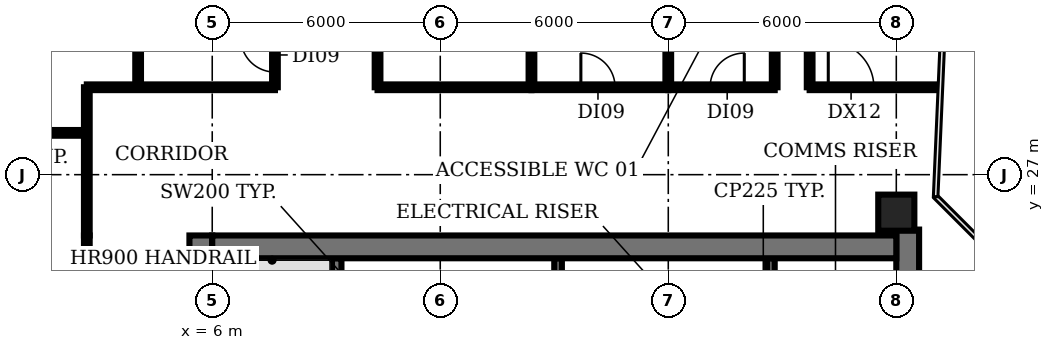
"""IFC4 building model, lengths in metres.
Left out: names, types, materials, properties, quantities, classifications, styles, units other than length and angle.
Written with IfcOpenShell. Run it as: python <this file> out.ifc"""

import sys

from ifc_helpers import new_model, si_unit, direction, frame, frame_2d, origin, origin_2d, place, context, subcontext, project, spatial, rectangle, circle, extrude, element, fill, save


model = new_model("IFC4")
c1 = context("Model", 3, precision=1e-05, world=origin(), true_north=direction((0.0, 1.0)))
c2 = subcontext(c1, "Body", "Model", "MODEL_VIEW")
j1 = project(units=[si_unit("LENGTHUNIT", "METRE"), si_unit("PLANEANGLEUNIT", "RADIAN")], contexts=[c1])
p1 = place(None, origin())
s1 = spatial("IfcSite", under=j1, at=p1, CompositionType="ELEMENT")
p2 = place(p1, origin())
s2 = spatial("IfcBuilding", under=s1, at=p2, CompositionType="ELEMENT")
p3 = place(p2, frame((0.0, 0.0, 159.2)))
s3 = spatial("IfcBuildingStorey", under=s2, at=p3, CompositionType="ELEMENT", Elevation=159.2)
p4 = place(p3, frame((24.0, 26.0, 0.0), z_axis=(0.0, 0.0, 1.0), x_axis=(1.0, 0.0, 0.0)))
e1 = element("IfcColumn", 1, at=p4, inside=s3, PredefinedType="COLUMN", context=c2, shape_type="SweptSolid", body=[
    extrude(circle(Radius=0.475, at=origin_2d()), origin(), (0.0, 0.0, 1.0), 3.85),
])
p5 = place(p3, frame((9.275, 18.375, 0.0), z_axis=(0.0, 0.0, 1.0), x_axis=(0.0, 1.0, 0.0)))
e2 = element("IfcWall", 2, at=p5, inside=s3, PredefinedType="SHEAR", context=c2, shape_type="SweptSolid", body=[
    extrude(rectangle(XDim=6.425, YDim=0.25, at=frame_2d((3.212, 0.0))), origin(), (0.0, 0.0, 1.0), 3.85),
])
for number, where, z_axis, x_axis in (
    (3, (15.1, 22.9, 0.0), (0.0, 0.0, 1.0), (0.0, 1.0, 0.0)),
    (4, (20.7, 22.9, 0.0), (0.0, 0.0, 1.0), (0.0, 1.0, 0.0)),
):
    element("IfcWall", number, at=place(p3, frame(where, z_axis=z_axis, x_axis=x_axis)), inside=s3, PredefinedType="SHEAR", context=c2, shape_type="SweptSolid", body=[
        extrude(rectangle(XDim=1.9, YDim=0.2, at=frame_2d((0.95, 0.0))), origin(), (0.0, 0.0, 1.0), 3.85),
    ])
p6 = place(p3, frame((5.7, 4.8, 0.0), z_axis=(0.0, 0.0, 1.0), x_axis=(0.0, 1.0, 0.0)))
e5 = element("IfcWall", 5, at=p6, inside=s3, PredefinedType="SHEAR", context=c2, shape_type="SweptSolid", body=[
    extrude(rectangle(XDim=20.6, YDim=0.6, at=frame_2d((10.3, 0.0))), origin(), (0.0, 0.0, 1.0), 3.85),
])
p7 = place(p6, frame((0.85, 0.0, 0.0)))
e6 = element("IfcOpeningElement", 6, at=p7, cuts=e5, PredefinedType="OPENING", context=c2, shape_type="SweptSolid", body=[
    extrude(rectangle(XDim=1.5, YDim=2.1, at=frame_2d((0.75, 1.05))), frame((0.0, 0.31, 0.0), z_axis=(0.0, -1.0, 0.0), x_axis=(1.0, 0.0, 0.0)), (0.0, 0.0, 1.0), 0.62),
])
p8 = place(p6, frame((7.3, 0.0, 0.0)))
e7 = element("IfcOpeningElement", 7, at=p8, cuts=e5, PredefinedType="OPENING", context=c2, shape_type="SweptSolid", body=[
    extrude(rectangle(XDim=1.2, YDim=2.1, at=frame_2d((0.6, 1.05))), frame((0.0, 0.31, 0.0), z_axis=(0.0, -1.0, 0.0), x_axis=(1.0, 0.0, 0.0)), (0.0, 0.0, 1.0), 0.62),
])
p9 = place(p6, frame((13.85, 0.0, 0.0)))
e8 = element("IfcOpeningElement", 8, at=p9, cuts=e5, PredefinedType="OPENING", context=c2, shape_type="SweptSolid", body=[
    extrude(rectangle(XDim=1.2, YDim=2.1, at=frame_2d((0.6, 1.05))), frame((0.0, 0.31, 0.0), z_axis=(0.0, -1.0, 0.0), x_axis=(1.0, 0.0, 0.0)), (0.0, 0.0, 1.0), 0.62),
])
p10 = place(p3, frame((24.3, 25.555, 0.0), z_axis=(0.0, 0.0, 1.0), x_axis=(0.0, -1.0, 0.0)))
e9 = element("IfcWall", 9, at=p10, inside=s3, PredefinedType="SHEAR", context=c2, shape_type="SweptSolid", body=[
    extrude(rectangle(XDim=20.755, YDim=0.6, at=frame_2d((10.377, 0.0))), origin(), (0.0, 0.0, 1.0), 3.85),
])
p11 = place(p10, frame((18.405, 0.0, 0.0)))
e10 = element("IfcOpeningElement", 10, at=p11, cuts=e9, PredefinedType="OPENING", context=c2, shape_type="SweptSolid", body=[
    extrude(rectangle(XDim=1.5, YDim=2.1, at=frame_2d((0.75, 1.05))), frame((0.0, 0.31, 0.0), z_axis=(0.0, -1.0, 0.0), x_axis=(1.0, 0.0, 0.0)), (0.0, 0.0, 1.0), 0.62),
])
p12 = place(p10, frame((12.305, 0.0, 0.0)))
e11 = element("IfcOpeningElement", 11, at=p12, cuts=e9, PredefinedType="OPENING", context=c2, shape_type="SweptSolid", body=[
    extrude(rectangle(XDim=0.9, YDim=2.1, at=frame_2d((0.45, 1.05))), frame((0.0, 0.31, 0.0), z_axis=(0.0, -1.0, 0.0), x_axis=(1.0, 0.0, 0.0)), (0.0, 0.0, 1.0), 0.62),
])
p13 = place(p10, frame((6.305, 0.0, 0.0)))
e12 = element("IfcOpeningElement", 12, at=p13, cuts=e9, PredefinedType="OPENING", context=c2, shape_type="SweptSolid", body=[
    extrude(rectangle(XDim=2.0, YDim=2.1, at=frame_2d((1.0, 1.05))), frame((0.0, 0.31, 0.0), z_axis=(0.0, -1.0, 0.0), x_axis=(1.0, 0.0, 0.0)), (0.0, 0.0, 1.0), 0.62),
])
p14 = place(p3, frame((6.0, 25.1, 0.0), z_axis=(0.0, 0.0, 1.0), x_axis=(1.0, 0.0, 0.0)))
e13 = element("IfcWall", 13, at=p14, inside=s3, PredefinedType="SHEAR", context=c2, shape_type="SweptSolid", body=[
    extrude(rectangle(XDim=18.0, YDim=0.6, at=frame_2d((9.0, 0.0))), origin(), (0.0, 0.0, 1.0), 3.85),
])
p15 = place(p3, frame((-0.98, 28.1, 0.0), z_axis=(0.0, 0.0, 1.0), x_axis=(1.0, 0.0, 0.0)))
e14 = element("IfcWall", 14, at=p15, inside=s3, PredefinedType="PARTITIONING", context=c2, shape_type="SweptSolid", body=[
    extrude(rectangle(XDim=3.68, YDim=0.15, at=frame_2d((1.84, 0.0))), origin(), (0.0, 0.0, 1.0), 2.88),
])
p16 = place(p3, frame((2.7, 4.8, 0.0), z_axis=(0.0, 0.0, 1.0), x_axis=(0.0, 1.0, 0.0)))
e15 = element("IfcWall", 15, at=p16, inside=s3, PredefinedType="PARTITIONING", context=c2, shape_type="SweptSolid", body=[
    extrude(rectangle(XDim=20.6, YDim=0.15, at=frame_2d((10.3, 0.0))), origin(), (0.0, 0.0, 1.0), 2.88),
])
p17 = place(p16, frame((10.2, 0.0, 0.0)))
e16 = element("IfcOpeningElement", 16, at=p17, cuts=e15, PredefinedType="OPENING", context=c2, shape_type="SweptSolid", body=[
    extrude(rectangle(XDim=1.2, YDim=2.1, at=frame_2d((0.6, 1.05))), frame((0.0, 0.085, 0.0), z_axis=(0.0, -1.0, 0.0), x_axis=(1.0, 0.0, 0.0)), (0.0, 0.0, 1.0), 0.17),
])
p18 = place(p3, frame((2.7, 25.4, 0.0), z_axis=(0.0, 0.0, 1.0), x_axis=(0.0, 1.0, 0.0)))
e17 = element("IfcWall", 17, at=p18, inside=s3, PredefinedType="PARTITIONING", context=c2, shape_type="SweptSolid", body=[
    extrude(rectangle(XDim=3.9, YDim=0.15, at=frame_2d((1.95, 0.0))), origin(), (0.0, 0.0, 1.0), 2.88),
])
p19 = place(p3, frame((2.7, 29.3, 0.0), z_axis=(0.0, 0.0, 1.0), x_axis=(1.0, 0.0, 0.0)))
e18 = element("IfcWall", 18, at=p19, inside=s3, PredefinedType="PARTITIONING", context=c2, shape_type="SweptSolid", body=[
    extrude(rectangle(XDim=4.95, YDim=0.15, at=frame_2d((2.475, 0.0))), origin(), (0.0, 0.0, 1.0), 2.88),
])
p20 = place(p3, frame((4.05, 29.3, 0.0), z_axis=(0.0, 0.0, 1.0), x_axis=(0.0, 1.0, 0.0)))
e19 = element("IfcWall", 19, at=p20, inside=s3, PredefinedType="PARTITIONING", context=c2, shape_type="SweptSolid", body=[
    extrude(rectangle(XDim=4.8, YDim=0.15, at=frame_2d((2.4, 0.0))), origin(), (0.0, 0.0, 1.0), 2.88),
])
p21 = place(p3, frame((7.65, 29.3, 0.0), z_axis=(0.0, 0.0, 1.0), x_axis=(0.0, 1.0, 0.0)))
e20 = element("IfcWall", 20, at=p21, inside=s3, PredefinedType="PARTITIONING", context=c2, shape_type="SweptSolid", body=[
    extrude(rectangle(XDim=4.8, YDim=0.15, at=frame_2d((2.4, 0.0))), origin(), (0.0, 0.0, 1.0), 2.88),
])
p22 = place(p21, frame((0.4, 0.0, 0.0)))
e21 = element("IfcOpeningElement", 21, at=p22, cuts=e20, PredefinedType="OPENING", context=c2, shape_type="SweptSolid", body=[
    extrude(rectangle(XDim=0.9, YDim=2.1, at=frame_2d((0.45, 1.05))), frame((0.0, 0.085, 0.0), z_axis=(0.0, -1.0, 0.0), x_axis=(1.0, 0.0, 0.0)), (0.0, 0.0, 1.0), 0.17),
])
p23 = place(p3, frame((10.35, 29.3, 0.0), z_axis=(0.0, 0.0, 1.0), x_axis=(0.0, 1.0, 0.0)))
e22 = element("IfcWall", 22, at=p23, inside=s3, PredefinedType="PARTITIONING", context=c2, shape_type="SweptSolid", body=[
    extrude(rectangle(XDim=4.8, YDim=0.15, at=frame_2d((2.4, 0.0))), origin(), (0.0, 0.0, 1.0), 2.88),
])
p24 = place(p3, frame((10.35, 29.3, 0.0), z_axis=(0.0, 0.0, 1.0), x_axis=(1.0, 0.0, 0.0)))
e23 = element("IfcWall", 23, at=p24, inside=s3, PredefinedType="PARTITIONING", context=c2, shape_type="SweptSolid", body=[
    extrude(rectangle(XDim=4.05, YDim=0.15, at=frame_2d((2.025, 0.0))), origin(), (0.0, 0.0, 1.0), 2.88),
])
p25 = place(p3, frame((14.4, 29.3, 0.0), z_axis=(0.0, 0.0, 1.0), x_axis=(0.0, 1.0, 0.0)))
e24 = element("IfcWall", 24, at=p25, inside=s3, PredefinedType="PARTITIONING", context=c2, shape_type="SweptSolid", body=[
    extrude(rectangle(XDim=4.8, YDim=0.15, at=frame_2d((2.4, 0.0))), origin(), (0.0, 0.0, 1.0), 2.88),
])
p26 = place(p3, frame((14.4, 29.3, 0.0), z_axis=(0.0, 0.0, 1.0), x_axis=(1.0, 0.0, 0.0)))
e25 = element("IfcWall", 25, at=p26, inside=s3, PredefinedType="PARTITIONING", context=c2, shape_type="SweptSolid", body=[
    extrude(rectangle(XDim=3.6, YDim=0.15, at=frame_2d((1.8, 0.0))), origin(), (0.0, 0.0, 1.0), 2.88),
])
p27 = place(p26, frame((1.3, 0.0, 0.0)))
e26 = element("IfcOpeningElement", 26, at=p27, cuts=e25, PredefinedType="OPENING", context=c2, shape_type="SweptSolid", body=[
    extrude(rectangle(XDim=0.9, YDim=2.1, at=frame_2d((0.45, 1.05))), frame((0.0, 0.085, 0.0), z_axis=(0.0, -1.0, 0.0), x_axis=(1.0, 0.0, 0.0)), (0.0, 0.0, 1.0), 0.17),
])
p28 = place(p3, frame((18.0, 29.3, 0.0), z_axis=(0.0, 0.0, 1.0), x_axis=(0.0, 1.0, 0.0)))
e27 = element("IfcWall", 27, at=p28, inside=s3, PredefinedType="PARTITIONING", context=c2, shape_type="SweptSolid", body=[
    extrude(rectangle(XDim=4.8, YDim=0.15, at=frame_2d((2.4, 0.0))), origin(), (0.0, 0.0, 1.0), 2.88),
])
p29 = place(p3, frame((18.0, 29.3, 0.0), z_axis=(0.0, 0.0, 1.0), x_axis=(1.0, 0.0, 0.0)))
e28 = element("IfcWall", 28, at=p29, inside=s3, PredefinedType="PARTITIONING", context=c2, shape_type="SweptSolid", body=[
    extrude(rectangle(XDim=2.8, YDim=0.15, at=frame_2d((1.4, 0.0))), origin(), (0.0, 0.0, 1.0), 2.88),
])
p30 = place(p29, frame((1.1, 0.0, 0.0)))
e29 = element("IfcOpeningElement", 29, at=p30, cuts=e28, PredefinedType="OPENING", context=c2, shape_type="SweptSolid", body=[
    extrude(rectangle(XDim=0.9, YDim=2.1, at=frame_2d((0.45, 1.05))), frame((0.0, 0.085, 0.0), z_axis=(0.0, -1.0, 0.0), x_axis=(1.0, 0.0, 0.0)), (0.0, 0.0, 1.0), 0.17),
])
for number, where, z_axis, x_axis in (
    (30, (20.8, 29.3, 0.0), (0.0, 0.0, 1.0), (0.0, 1.0, 0.0)),
    (31, (21.72, 29.3, 0.0), (0.0, 0.0, 1.0), (0.0, 1.0, 0.0)),
):
    element("IfcWall", number, at=place(p3, frame(where, z_axis=z_axis, x_axis=x_axis)), inside=s3, PredefinedType="PARTITIONING", context=c2, shape_type="SweptSolid", body=[
        extrude(rectangle(XDim=4.8, YDim=0.15, at=frame_2d((2.4, 0.0))), origin(), (0.0, 0.0, 1.0), 2.88),
    ])
p31 = place(p3, frame((21.72, 29.3, 0.0), z_axis=(0.0, 0.0, 1.0), x_axis=(1.0, 0.0, 0.0)))
e32 = element("IfcWall", 32, at=p31, inside=s3, PredefinedType="PARTITIONING", context=c2, shape_type="SweptSolid", body=[
    extrude(rectangle(XDim=3.39, YDim=0.15, at=frame_2d((1.695, 0.0))), origin(), (0.0, 0.0, 1.0), 2.88),
])
p32 = place(p31, frame((0.49, 0.0, 0.0)))
e33 = element("IfcOpeningElement", 33, at=p32, cuts=e32, PredefinedType="OPENING", context=c2, shape_type="SweptSolid", body=[
    extrude(rectangle(XDim=1.2, YDim=2.1, at=frame_2d((0.6, 1.05))), frame((0.0, 0.085, 0.0), z_axis=(0.0, -1.0, 0.0), x_axis=(1.0, 0.0, 0.0)), (0.0, 0.0, 1.0), 0.17),
])
p33 = place(p22, origin())
e34 = element("IfcDoor", 34, at=p33, inside=s3, OperationType="SINGLE_SWING_RIGHT", PredefinedType="DOOR", context=c2, shape_type="SweptSolid", body=[
    extrude(rectangle(XDim=0.9, YDim=2.1, at=frame_2d((0.45, 1.05))), frame((0.0, 0.025, 0.0), z_axis=(0.0, -1.0, 0.0), x_axis=(1.0, 0.0, 0.0)), (0.0, 0.0, 1.0), 0.05),
])
fill(e21, e34)
p34 = place(p27, origin())
e35 = element("IfcDoor", 35, at=p34, inside=s3, OperationType="SINGLE_SWING_LEFT", PredefinedType="DOOR", context=c2, shape_type="SweptSolid", body=[
    extrude(rectangle(XDim=0.9, YDim=2.1, at=frame_2d((0.45, 1.05))), frame((0.0, 0.025, 0.0), z_axis=(0.0, -1.0, 0.0), x_axis=(1.0, 0.0, 0.0)), (0.0, 0.0, 1.0), 0.05),
])
fill(e26, e35)
p35 = place(p30, origin())
e36 = element("IfcDoor", 36, at=p35, inside=s3, OperationType="SINGLE_SWING_RIGHT", PredefinedType="DOOR", context=c2, shape_type="SweptSolid", body=[
    extrude(rectangle(XDim=0.9, YDim=2.1, at=frame_2d((0.45, 1.05))), frame((0.0, 0.025, 0.0), z_axis=(0.0, -1.0, 0.0), x_axis=(1.0, 0.0, 0.0)), (0.0, 0.0, 1.0), 0.05),
])
fill(e29, e36)
p36 = place(p32, origin())
e37 = element("IfcDoor", 37, at=p36, inside=s3, OperationType="SINGLE_SWING_LEFT", PredefinedType="DOOR", context=c2, shape_type="SweptSolid", body=[
    extrude(rectangle(XDim=1.2, YDim=2.1, at=frame_2d((0.6, 1.05))), frame((0.0, 0.025, 0.0), z_axis=(0.0, -1.0, 0.0), x_axis=(1.0, 0.0, 0.0)), (0.0, 0.0, 1.0), 0.05),
])
fill(e33, e37)
save(model, sys.argv[1])
